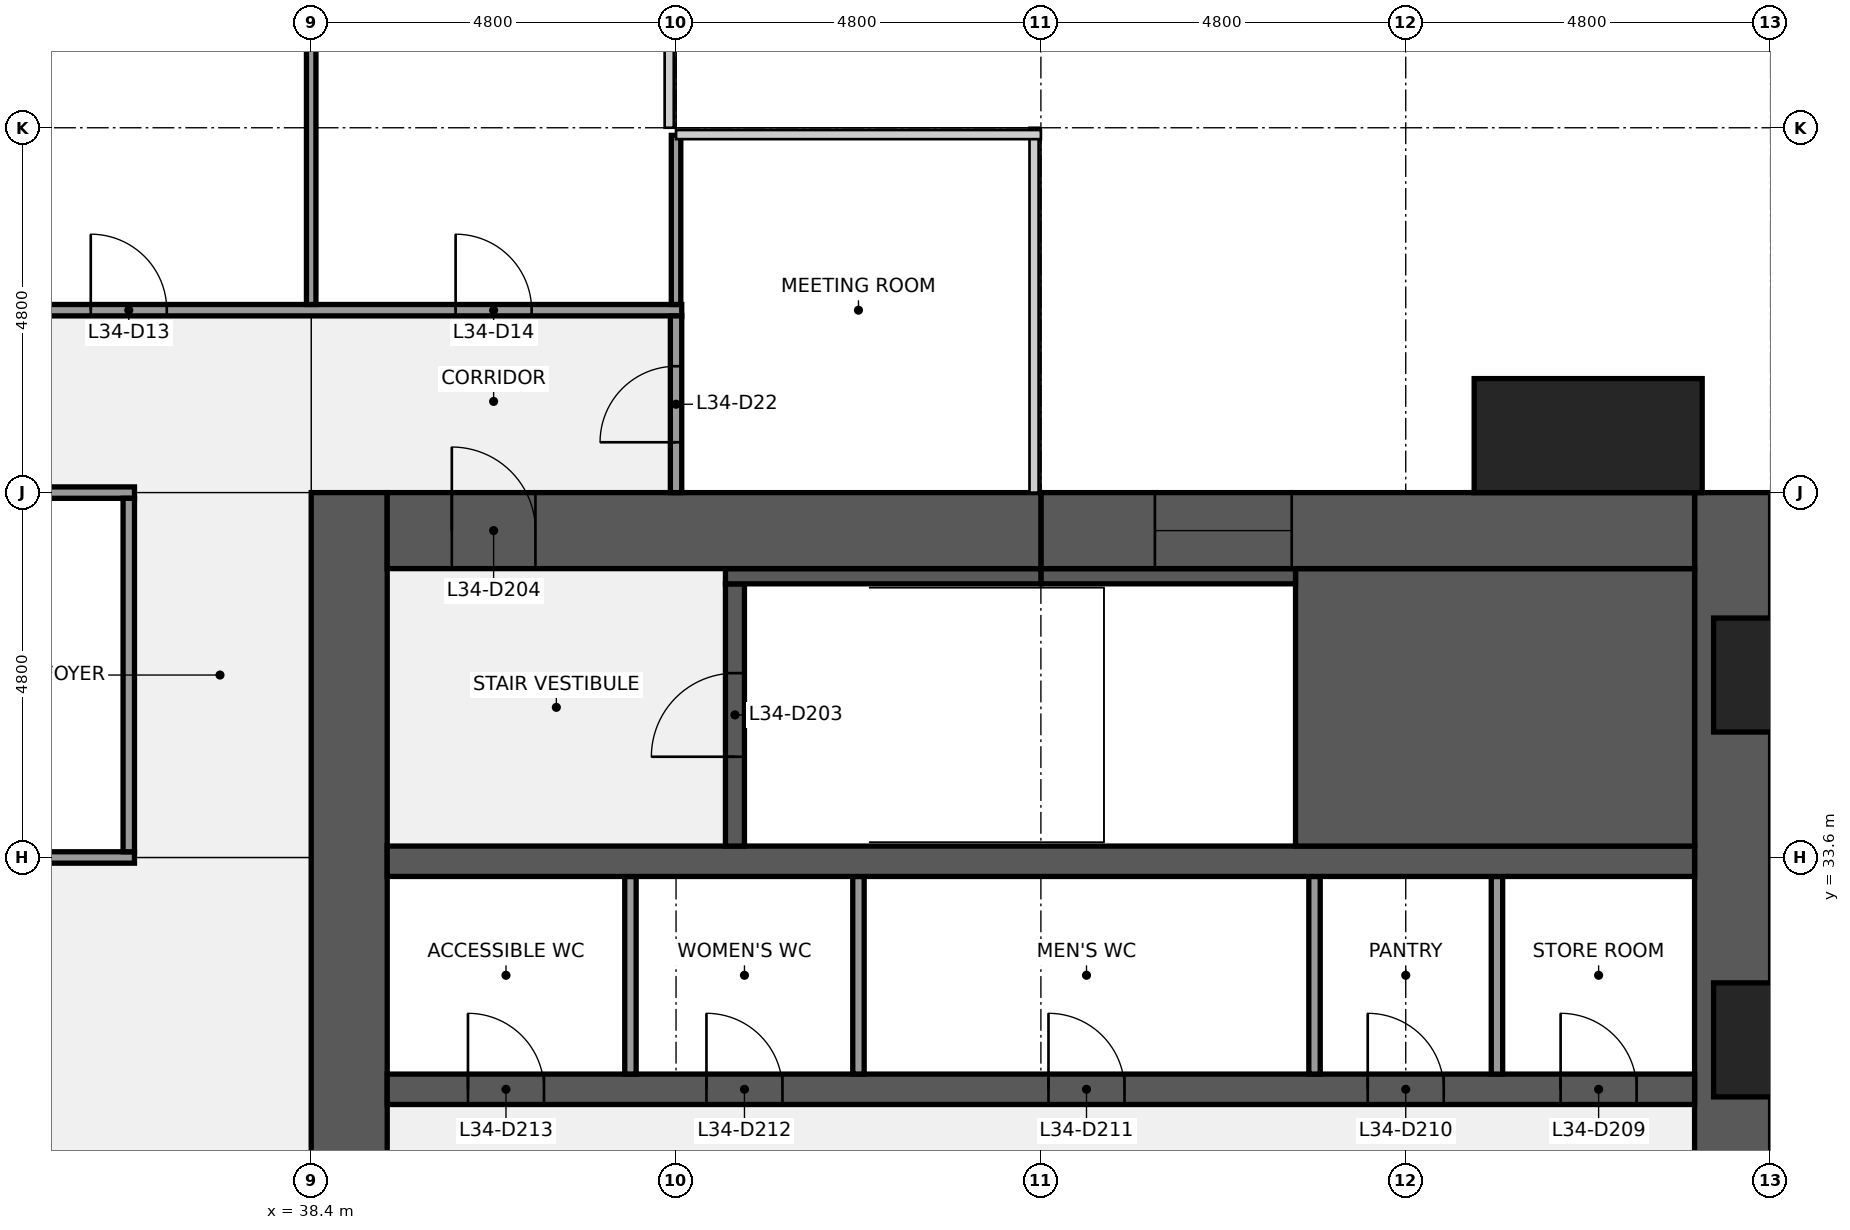
"""IFC4 building model, lengths in metres.
Left out: names, types, materials, properties, quantities, classifications, styles, units other than length and angle.
Written with IfcOpenShell. Run it as: python <this file> out.ifc"""

import sys

from ifc_helpers import new_model, si_unit, direction, frame, frame_2d, origin, origin_2d, place, context, subcontext, project, spatial, rectangle, extrude, element, fill, save


model = new_model("IFC4")
c1 = context("Model", 3, precision=1e-05, world=origin(), true_north=direction((0.0, 1.0)))
c2 = subcontext(c1, "Body", "Model", "MODEL_VIEW")
j1 = project(units=[si_unit("LENGTHUNIT", "METRE"), si_unit("PLANEANGLEUNIT", "RADIAN")], contexts=[c1])
p1 = place(None, origin())
s1 = spatial("IfcSite", under=j1, at=p1, CompositionType="ELEMENT")
p2 = place(p1, origin())
s2 = spatial("IfcBuilding", under=s1, at=p2, CompositionType="ELEMENT")
p3 = place(p2, frame((0.0, 0.0, 156.1)))
s3 = spatial("IfcBuildingStorey", under=s2, at=p3, CompositionType="ELEMENT", Elevation=156.1)
p4 = place(p3, frame((57.1, 38.4, 0.0), z_axis=(0.0, 0.0, 1.0), x_axis=(0.0, -1.0, 0.0)))
e1 = element("IfcWall", 1, at=p4, inside=s3, PredefinedType="SHEAR", context=c2, shape_type="SweptSolid", body=[
    extrude(rectangle(XDim=28.8, YDim=1.0, at=frame_2d((14.4, 0.0))), origin(), (0.0, 0.0, 1.0), 3.84),
])
p5 = place(p4, frame((18.45, 0.0, 0.9)))
e2 = element("IfcOpeningElement", 2, at=p5, cuts=e1, PredefinedType="OPENING", context=c2, shape_type="SweptSolid", body=[
    extrude(rectangle(XDim=1.5, YDim=1.5, at=frame_2d((0.75, 0.75))), frame((0.0, 0.51, 0.0), z_axis=(0.0, -1.0, 0.0), x_axis=(1.0, 0.0, 0.0)), (0.0, 0.0, 1.0), 1.02),
])
p6 = place(p4, frame((8.85, 0.0, 0.9)))
e3 = element("IfcOpeningElement", 3, at=p6, cuts=e1, PredefinedType="OPENING", context=c2, shape_type="SweptSolid", body=[
    extrude(rectangle(XDim=1.5, YDim=1.5, at=frame_2d((0.75, 0.75))), frame((0.0, 0.51, 0.0), z_axis=(0.0, -1.0, 0.0), x_axis=(1.0, 0.0, 0.0)), (0.0, 0.0, 1.0), 1.02),
])
p7 = place(p3, frame((38.9, 9.6, 0.0), z_axis=(0.0, 0.0, 1.0), x_axis=(0.0, 1.0, 0.0)))
e4 = element("IfcWall", 4, at=p7, inside=s3, PredefinedType="SHEAR", context=c2, shape_type="SweptSolid", body=[
    extrude(rectangle(XDim=28.8, YDim=1.0, at=frame_2d((14.4, 0.0))), origin(), (0.0, 0.0, 1.0), 3.84),
])
p8 = place(p7, frame((8.7, 0.0, 0.0)))
e5 = element("IfcOpeningElement", 5, at=p8, cuts=e4, PredefinedType="OPENING", context=c2, shape_type="SweptSolid", body=[
    extrude(rectangle(XDim=1.8, YDim=2.1, at=frame_2d((0.9, 1.05))), frame((0.0, 0.51, 0.0), z_axis=(0.0, -1.0, 0.0), x_axis=(1.0, 0.0, 0.0)), (0.0, 0.0, 1.0), 1.02),
])
p9 = place(p7, frame((18.3, 0.0, 0.0)))
e6 = element("IfcOpeningElement", 6, at=p9, cuts=e4, PredefinedType="OPENING", context=c2, shape_type="SweptSolid", body=[
    extrude(rectangle(XDim=1.8, YDim=2.1, at=frame_2d((0.9, 1.05))), frame((0.0, 0.51, 0.0), z_axis=(0.0, -1.0, 0.0), x_axis=(1.0, 0.0, 0.0)), (0.0, 0.0, 1.0), 1.02),
])
p10 = place(p3, frame((39.4, 30.55, 0.0), z_axis=(0.0, 0.0, 1.0), x_axis=(1.0, 0.0, 0.0)))
e7 = element("IfcWall", 7, at=p10, inside=s3, PredefinedType="SHEAR", context=c2, shape_type="SweptSolid", body=[
    extrude(rectangle(XDim=17.2, YDim=0.4, at=frame_2d((8.6, 0.0))), origin(), (0.0, 0.0, 1.0), 3.84),
])
p11 = place(p10, frame((15.438, 0.0, 0.0)))
e8 = element("IfcOpeningElement", 8, at=p11, cuts=e7, PredefinedType="OPENING", context=c2, shape_type="SweptSolid", body=[
    extrude(rectangle(XDim=1.0, YDim=2.1, at=frame_2d((0.5, 1.05))), frame((0.0, 0.21, 0.0), z_axis=(0.0, -1.0, 0.0), x_axis=(1.0, 0.0, 0.0)), (0.0, 0.0, 1.0), 0.42),
])
p12 = place(p10, frame((12.9, 0.0, 0.0)))
e9 = element("IfcOpeningElement", 9, at=p12, cuts=e7, PredefinedType="OPENING", context=c2, shape_type="SweptSolid", body=[
    extrude(rectangle(XDim=1.0, YDim=2.1, at=frame_2d((0.5, 1.05))), frame((0.0, 0.21, 0.0), z_axis=(0.0, -1.0, 0.0), x_axis=(1.0, 0.0, 0.0)), (0.0, 0.0, 1.0), 0.42),
])
p13 = place(p10, frame((8.7, 0.0, 0.0)))
e10 = element("IfcOpeningElement", 10, at=p13, cuts=e7, PredefinedType="OPENING", context=c2, shape_type="SweptSolid", body=[
    extrude(rectangle(XDim=1.0, YDim=2.1, at=frame_2d((0.5, 1.05))), frame((0.0, 0.21, 0.0), z_axis=(0.0, -1.0, 0.0), x_axis=(1.0, 0.0, 0.0)), (0.0, 0.0, 1.0), 0.42),
])
p14 = place(p10, frame((4.2, 0.0, 0.0)))
e11 = element("IfcOpeningElement", 11, at=p14, cuts=e7, PredefinedType="OPENING", context=c2, shape_type="SweptSolid", body=[
    extrude(rectangle(XDim=1.0, YDim=2.1, at=frame_2d((0.5, 1.05))), frame((0.0, 0.21, 0.0), z_axis=(0.0, -1.0, 0.0), x_axis=(1.0, 0.0, 0.0)), (0.0, 0.0, 1.0), 0.42),
])
p15 = place(p10, frame((1.062, 0.0, 0.0)))
e12 = element("IfcOpeningElement", 12, at=p15, cuts=e7, PredefinedType="OPENING", context=c2, shape_type="SweptSolid", body=[
    extrude(rectangle(XDim=1.0, YDim=2.1, at=frame_2d((0.5, 1.05))), frame((0.0, 0.21, 0.0), z_axis=(0.0, -1.0, 0.0), x_axis=(1.0, 0.0, 0.0)), (0.0, 0.0, 1.0), 0.42),
])
for number, where, z_axis, x_axis in (
    (13, (54.0, 30.75, 0.0), (0.0, 0.0, 1.0), (0.0, 1.0, 0.0)),
    (14, (51.6, 30.75, 0.0), (0.0, 0.0, 1.0), (0.0, 1.0, 0.0)),
    (15, (45.6, 30.75, 0.0), (0.0, 0.0, 1.0), (0.0, 1.0, 0.0)),
    (16, (42.6, 30.75, 0.0), (0.0, 0.0, 1.0), (0.0, 1.0, 0.0)),
):
    element("IfcWall", number, at=place(p3, frame(where, z_axis=z_axis, x_axis=x_axis)), inside=s3, PredefinedType="PARTITIONING", context=c2, shape_type="SweptSolid", body=[
        extrude(rectangle(XDim=2.6, YDim=0.15, at=frame_2d((1.3, 0.0))), origin(), (0.0, 0.0, 1.0), 3.84),
    ])
p16 = place(p3, frame((39.4, 33.55, 0.0), z_axis=(0.0, 0.0, 1.0), x_axis=(1.0, 0.0, 0.0)))
e17 = element("IfcWall", 17, at=p16, inside=s3, PredefinedType="SHEAR", context=c2, shape_type="SweptSolid", body=[
    extrude(rectangle(XDim=17.2, YDim=0.4, at=frame_2d((8.6, 0.0))), origin(), (0.0, 0.0, 1.0), 3.84),
])
p17 = place(p3, frame((51.35, 35.575, 0.0), z_axis=(0.0, 0.0, 1.0), x_axis=(1.0, 0.0, 0.0)))
e18 = element("IfcWall", 18, at=p17, inside=s3, PredefinedType="SHEAR", context=c2, shape_type="SweptSolid", body=[
    extrude(rectangle(XDim=5.25, YDim=3.65, at=frame_2d((2.625, 0.0))), origin(), (0.0, 0.0, 1.0), 3.84),
])
p18 = place(p3, frame((43.975, 33.75, 0.0), z_axis=(0.0, 0.0, 1.0), x_axis=(0.0, 1.0, 0.0)))
e19 = element("IfcWall", 19, at=p18, inside=s3, PredefinedType="SHEAR", context=c2, shape_type="SweptSolid", body=[
    extrude(rectangle(XDim=3.45, YDim=0.25, at=frame_2d((1.725, 0.0))), origin(), (0.0, 0.0, 1.0), 3.84),
])
p19 = place(p18, frame((1.175, 0.0, 0.0)))
e20 = element("IfcOpeningElement", 20, at=p19, cuts=e19, PredefinedType="OPENING", context=c2, shape_type="SweptSolid", body=[
    extrude(rectangle(XDim=1.1, YDim=2.1, at=frame_2d((0.55, 1.05))), frame((0.0, 0.135, 0.0), z_axis=(0.0, -1.0, 0.0), x_axis=(1.0, 0.0, 0.0)), (0.0, 0.0, 1.0), 0.27),
])
p20 = place(p3, frame((48.0, 37.3, 0.0), z_axis=(0.0, 0.0, 1.0), x_axis=(1.0, 0.0, 0.0)))
e21 = element("IfcWall", 21, at=p20, inside=s3, PredefinedType="SHEAR", context=c2, shape_type="SweptSolid", body=[
    extrude(rectangle(XDim=3.35, YDim=0.2, at=frame_2d((1.675, 0.0))), origin(), (0.0, 0.0, 1.0), 3.84),
])
p21 = place(p3, frame((43.85, 37.3, 0.0), z_axis=(0.0, 0.0, 1.0), x_axis=(1.0, 0.0, 0.0)))
e22 = element("IfcWall", 22, at=p21, inside=s3, PredefinedType="SHEAR", context=c2, shape_type="SweptSolid", body=[
    extrude(rectangle(XDim=4.15, YDim=0.2, at=frame_2d((2.075, 0.0))), origin(), (0.0, 0.0, 1.0), 3.84),
])
p22 = place(p3, frame((48.0, 37.9, 0.0), z_axis=(0.0, 0.0, 1.0), x_axis=(1.0, 0.0, 0.0)))
e23 = element("IfcWall", 23, at=p22, inside=s3, PredefinedType="SHEAR", context=c2, shape_type="SweptSolid", body=[
    extrude(rectangle(XDim=8.6, YDim=1.0, at=frame_2d((4.3, 0.0))), origin(), (0.0, 0.0, 1.0), 3.84),
])
p23 = place(p22, frame((1.5, 0.0, 0.9)))
e24 = element("IfcOpeningElement", 24, at=p23, cuts=e23, PredefinedType="OPENING", context=c2, shape_type="SweptSolid", body=[
    extrude(rectangle(XDim=1.8, YDim=1.5, at=frame_2d((0.9, 0.75))), frame((0.0, 0.51, 0.0), z_axis=(0.0, -1.0, 0.0), x_axis=(1.0, 0.0, 0.0)), (0.0, 0.0, 1.0), 1.02),
])
p24 = place(p3, frame((39.4, 37.9, 0.0), z_axis=(0.0, 0.0, 1.0), x_axis=(1.0, 0.0, 0.0)))
e25 = element("IfcWall", 25, at=p24, inside=s3, PredefinedType="SHEAR", context=c2, shape_type="SweptSolid", body=[
    extrude(rectangle(XDim=8.6, YDim=1.0, at=frame_2d((4.3, 0.0))), origin(), (0.0, 0.0, 1.0), 3.84),
])
p25 = place(p24, frame((0.85, 0.0, 0.0)))
e26 = element("IfcOpeningElement", 26, at=p25, cuts=e25, PredefinedType="OPENING", context=c2, shape_type="SweptSolid", body=[
    extrude(rectangle(XDim=1.1, YDim=2.1, at=frame_2d((0.55, 1.05))), frame((0.0, 0.51, 0.0), z_axis=(0.0, -1.0, 0.0), x_axis=(1.0, 0.0, 0.0)), (0.0, 0.0, 1.0), 1.02),
])
p26 = place(p3, frame((31.275, 33.6, 0.0), z_axis=(0.0, 0.0, 1.0), x_axis=(1.0, 0.0, 0.0)))
e27 = element("IfcWall", 27, at=p26, inside=s3, PredefinedType="PARTITIONING", context=c2, shape_type="SweptSolid", body=[
    extrude(rectangle(XDim=4.8, YDim=0.15, at=frame_2d((2.4, 0.0))), origin(), (0.0, 0.0, 1.0), 2.936),
])
p27 = place(p3, frame((21.525, 38.4, 0.0), z_axis=(0.0, 0.0, 1.0), x_axis=(1.0, 0.0, 0.0)))
e28 = element("IfcWall", 28, at=p27, inside=s3, PredefinedType="PARTITIONING", context=c2, shape_type="SweptSolid", body=[
    extrude(rectangle(XDim=14.55, YDim=0.15, at=frame_2d((7.275, 0.0))), origin(), (0.0, 0.0, 1.0), 2.936),
])
p28 = place(p27, frame((3.175, 0.0, 0.0)))
e29 = element("IfcOpeningElement", 29, at=p28, cuts=e28, PredefinedType="OPENING", context=c2, shape_type="SweptSolid", body=[
    extrude(rectangle(XDim=1.0, YDim=2.1, at=frame_2d((0.5, 1.05))), frame((0.0, 0.085, 0.0), z_axis=(0.0, -1.0, 0.0), x_axis=(1.0, 0.0, 0.0)), (0.0, 0.0, 1.0), 0.17),
])
p29 = place(p27, frame((10.375, 0.0, 0.0)))
e30 = element("IfcOpeningElement", 30, at=p29, cuts=e28, PredefinedType="OPENING", context=c2, shape_type="SweptSolid", body=[
    extrude(rectangle(XDim=1.0, YDim=2.1, at=frame_2d((0.5, 1.05))), frame((0.0, 0.085, 0.0), z_axis=(0.0, -1.0, 0.0), x_axis=(1.0, 0.0, 0.0)), (0.0, 0.0, 1.0), 0.17),
])
p30 = place(p3, frame((14.325, 40.8, 0.0), z_axis=(0.0, 0.0, 1.0), x_axis=(1.0, 0.0, 0.0)))
e31 = element("IfcWall", 31, at=p30, inside=s3, PredefinedType="PARTITIONING", context=c2, shape_type="SweptSolid", body=[
    extrude(rectangle(XDim=28.95, YDim=0.15, at=frame_2d((14.475, 0.0))), origin(), (0.0, 0.0, 1.0), 2.936),
])
p31 = place(p30, frame((1.975, 0.0, 0.0)))
e32 = element("IfcOpeningElement", 32, at=p31, cuts=e31, PredefinedType="OPENING", context=c2, shape_type="SweptSolid", body=[
    extrude(rectangle(XDim=1.0, YDim=2.1, at=frame_2d((0.5, 1.05))), frame((0.0, 0.085, 0.0), z_axis=(0.0, -1.0, 0.0), x_axis=(1.0, 0.0, 0.0)), (0.0, 0.0, 1.0), 0.17),
])
p32 = place(p30, frame((7.975, 0.0, 0.0)))
e33 = element("IfcOpeningElement", 33, at=p32, cuts=e31, PredefinedType="OPENING", context=c2, shape_type="SweptSolid", body=[
    extrude(rectangle(XDim=1.0, YDim=2.1, at=frame_2d((0.5, 1.05))), frame((0.0, 0.085, 0.0), z_axis=(0.0, -1.0, 0.0), x_axis=(1.0, 0.0, 0.0)), (0.0, 0.0, 1.0), 0.17),
])
p33 = place(p30, frame((15.175, 0.0, 0.0)))
e34 = element("IfcOpeningElement", 34, at=p33, cuts=e31, PredefinedType="OPENING", context=c2, shape_type="SweptSolid", body=[
    extrude(rectangle(XDim=1.0, YDim=2.1, at=frame_2d((0.5, 1.05))), frame((0.0, 0.085, 0.0), z_axis=(0.0, -1.0, 0.0), x_axis=(1.0, 0.0, 0.0)), (0.0, 0.0, 1.0), 0.17),
])
p34 = place(p30, frame((21.175, 0.0, 0.0)))
e35 = element("IfcOpeningElement", 35, at=p34, cuts=e31, PredefinedType="OPENING", context=c2, shape_type="SweptSolid", body=[
    extrude(rectangle(XDim=1.0, YDim=2.1, at=frame_2d((0.5, 1.05))), frame((0.0, 0.085, 0.0), z_axis=(0.0, -1.0, 0.0), x_axis=(1.0, 0.0, 0.0)), (0.0, 0.0, 1.0), 0.17),
])
p35 = place(p30, frame((25.975, 0.0, 0.0)))
e36 = element("IfcOpeningElement", 36, at=p35, cuts=e31, PredefinedType="OPENING", context=c2, shape_type="SweptSolid", body=[
    extrude(rectangle(XDim=1.0, YDim=2.1, at=frame_2d((0.5, 1.05))), frame((0.0, 0.085, 0.0), z_axis=(0.0, -1.0, 0.0), x_axis=(1.0, 0.0, 0.0)), (0.0, 0.0, 1.0), 0.17),
])
p36 = place(p3, frame((36.0, 33.675, 0.0), z_axis=(0.0, 0.0, 1.0), x_axis=(0.0, 1.0, 0.0)))
e37 = element("IfcWall", 37, at=p36, inside=s3, PredefinedType="PARTITIONING", context=c2, shape_type="SweptSolid", body=[
    extrude(rectangle(XDim=4.65, YDim=0.15, at=frame_2d((2.325, 0.0))), origin(), (0.0, 0.0, 1.0), 2.936),
])
p37 = place(p3, frame((38.4, 40.875, 0.0), z_axis=(0.0, 0.0, 1.0), x_axis=(0.0, 1.0, 0.0)))
e38 = element("IfcWall", 38, at=p37, inside=s3, PredefinedType="PARTITIONING", context=c2, shape_type="SweptSolid", body=[
    extrude(rectangle(XDim=6.525, YDim=0.125, at=frame_2d((3.262, 0.0))), origin(), (0.0, 0.0, 1.0), 2.936),
])
p38 = place(p3, frame((43.2, 40.875, 0.0), z_axis=(0.0, 0.0, 1.0), x_axis=(0.0, 1.0, 0.0)))
e39 = element("IfcWall", 39, at=p38, inside=s3, PredefinedType="PARTITIONING", context=c2, shape_type="SweptSolid", body=[
    extrude(rectangle(XDim=2.225, YDim=0.125, at=frame_2d((1.113, 0.0))), origin(), (0.0, 0.0, 1.0), 2.936),
])
p39 = place(p3, frame((43.2, 38.4, 0.0), z_axis=(0.0, 0.0, 1.0), x_axis=(0.0, 1.0, 0.0)))
e40 = element("IfcWall", 40, at=p39, inside=s3, PredefinedType="PARTITIONING", context=c2, shape_type="SweptSolid", body=[
    extrude(rectangle(XDim=2.325, YDim=0.15, at=frame_2d((1.163, 0.0))), origin(), (0.0, 0.0, 1.0), 2.936),
])
p40 = place(p39, frame((0.663, 0.0, 0.0)))
e41 = element("IfcOpeningElement", 41, at=p40, cuts=e40, PredefinedType="OPENING", context=c2, shape_type="SweptSolid", body=[
    extrude(rectangle(XDim=1.0, YDim=2.1, at=frame_2d((0.5, 1.05))), frame((0.0, 0.085, 0.0), z_axis=(0.0, -1.0, 0.0), x_axis=(1.0, 0.0, 0.0)), (0.0, 0.0, 1.0), 0.17),
])
p41 = place(p3, frame((55.2, 39.15, 0.0), z_axis=(0.0, 0.0, 1.0), x_axis=(1.0, 0.0, 0.0)))
e42 = element("IfcColumn", 42, at=p41, inside=s3, PredefinedType="PILASTER", context=c2, shape_type="SweptSolid", body=[
    extrude(rectangle(XDim=3.0, YDim=1.5, at=origin_2d()), origin(), (0.0, 0.0, 1.0), 4.0),
])
p42 = place(p19, origin())
e43 = element("IfcDoor", 43, at=p42, inside=s3, OperationType="SINGLE_SWING_LEFT", PredefinedType="DOOR", context=c2, shape_type="SweptSolid", body=[
    extrude(rectangle(XDim=1.1, YDim=2.1, at=frame_2d((0.55, 1.05))), frame((0.0, 0.025, 0.0), z_axis=(0.0, -1.0, 0.0), x_axis=(1.0, 0.0, 0.0)), (0.0, 0.0, 1.0), 0.05),
])
fill(e20, e43)
p43 = place(p25, origin())
e44 = element("IfcDoor", 44, at=p43, inside=s3, OperationType="SINGLE_SWING_LEFT", PredefinedType="DOOR", context=c2, shape_type="SweptSolid", body=[
    extrude(rectangle(XDim=1.1, YDim=2.1, at=frame_2d((0.55, 1.05))), frame((0.0, 0.025, 0.0), z_axis=(0.0, -1.0, 0.0), x_axis=(1.0, 0.0, 0.0)), (0.0, 0.0, 1.0), 0.05),
])
fill(e26, e44)
p44 = place(p11, origin())
e45 = element("IfcDoor", 45, at=p44, inside=s3, OperationType="SINGLE_SWING_LEFT", PredefinedType="DOOR", context=c2, shape_type="SweptSolid", body=[
    extrude(rectangle(XDim=1.0, YDim=2.1, at=frame_2d((0.5, 1.05))), frame((0.0, 0.025, 0.0), z_axis=(0.0, -1.0, 0.0), x_axis=(1.0, 0.0, 0.0)), (0.0, 0.0, 1.0), 0.05),
])
fill(e8, e45)
p45 = place(p12, origin())
e46 = element("IfcDoor", 46, at=p45, inside=s3, OperationType="SINGLE_SWING_LEFT", PredefinedType="DOOR", context=c2, shape_type="SweptSolid", body=[
    extrude(rectangle(XDim=1.0, YDim=2.1, at=frame_2d((0.5, 1.05))), frame((0.0, 0.025, 0.0), z_axis=(0.0, -1.0, 0.0), x_axis=(1.0, 0.0, 0.0)), (0.0, 0.0, 1.0), 0.05),
])
fill(e9, e46)
p46 = place(p13, origin())
e47 = element("IfcDoor", 47, at=p46, inside=s3, OperationType="SINGLE_SWING_LEFT", PredefinedType="DOOR", context=c2, shape_type="SweptSolid", body=[
    extrude(rectangle(XDim=1.0, YDim=2.1, at=frame_2d((0.5, 1.05))), frame((0.0, 0.025, 0.0), z_axis=(0.0, -1.0, 0.0), x_axis=(1.0, 0.0, 0.0)), (0.0, 0.0, 1.0), 0.05),
])
fill(e10, e47)
p47 = place(p14, origin())
e48 = element("IfcDoor", 48, at=p47, inside=s3, OperationType="SINGLE_SWING_LEFT", PredefinedType="DOOR", context=c2, shape_type="SweptSolid", body=[
    extrude(rectangle(XDim=1.0, YDim=2.1, at=frame_2d((0.5, 1.05))), frame((0.0, 0.025, 0.0), z_axis=(0.0, -1.0, 0.0), x_axis=(1.0, 0.0, 0.0)), (0.0, 0.0, 1.0), 0.05),
])
fill(e11, e48)
p48 = place(p15, origin())
e49 = element("IfcDoor", 49, at=p48, inside=s3, OperationType="SINGLE_SWING_LEFT", PredefinedType="DOOR", context=c2, shape_type="SweptSolid", body=[
    extrude(rectangle(XDim=1.0, YDim=2.1, at=frame_2d((0.5, 1.05))), frame((0.0, 0.025, 0.0), z_axis=(0.0, -1.0, 0.0), x_axis=(1.0, 0.0, 0.0)), (0.0, 0.0, 1.0), 0.05),
])
fill(e12, e49)
p49 = place(p23, origin())
e50 = element("IfcWindow", 50, at=p49, inside=s3, PartitioningType="SINGLE_PANEL", PredefinedType="WINDOW", context=c2, shape_type="SweptSolid", body=[
    extrude(rectangle(XDim=1.8, YDim=1.5, at=frame_2d((0.9, 0.75))), frame((0.0, 0.03, 0.0), z_axis=(0.0, -1.0, 0.0), x_axis=(1.0, 0.0, 0.0)), (0.0, 0.0, 1.0), 0.06),
])
fill(e24, e50)
p50 = place(p34, origin())
e51 = element("IfcDoor", 51, at=p50, inside=s3, OperationType="SINGLE_SWING_LEFT", PredefinedType="DOOR", context=c2, shape_type="SweptSolid", body=[
    extrude(rectangle(XDim=1.0, YDim=2.1, at=frame_2d((0.5, 1.05))), frame((0.0, 0.025, 0.0), z_axis=(0.0, -1.0, 0.0), x_axis=(1.0, 0.0, 0.0)), (0.0, 0.0, 1.0), 0.05),
])
fill(e35, e51)
p51 = place(p35, origin())
e52 = element("IfcDoor", 52, at=p51, inside=s3, OperationType="SINGLE_SWING_LEFT", PredefinedType="DOOR", context=c2, shape_type="SweptSolid", body=[
    extrude(rectangle(XDim=1.0, YDim=2.1, at=frame_2d((0.5, 1.05))), frame((0.0, 0.025, 0.0), z_axis=(0.0, -1.0, 0.0), x_axis=(1.0, 0.0, 0.0)), (0.0, 0.0, 1.0), 0.05),
])
fill(e36, e52)
p52 = place(p40, origin())
e53 = element("IfcDoor", 53, at=p52, inside=s3, OperationType="SINGLE_SWING_LEFT", PredefinedType="DOOR", context=c2, shape_type="SweptSolid", body=[
    extrude(rectangle(XDim=1.0, YDim=2.1, at=frame_2d((0.5, 1.05))), frame((0.0, 0.025, 0.0), z_axis=(0.0, -1.0, 0.0), x_axis=(1.0, 0.0, 0.0)), (0.0, 0.0, 1.0), 0.05),
])
fill(e41, e53)
save(model, sys.argv[1])
